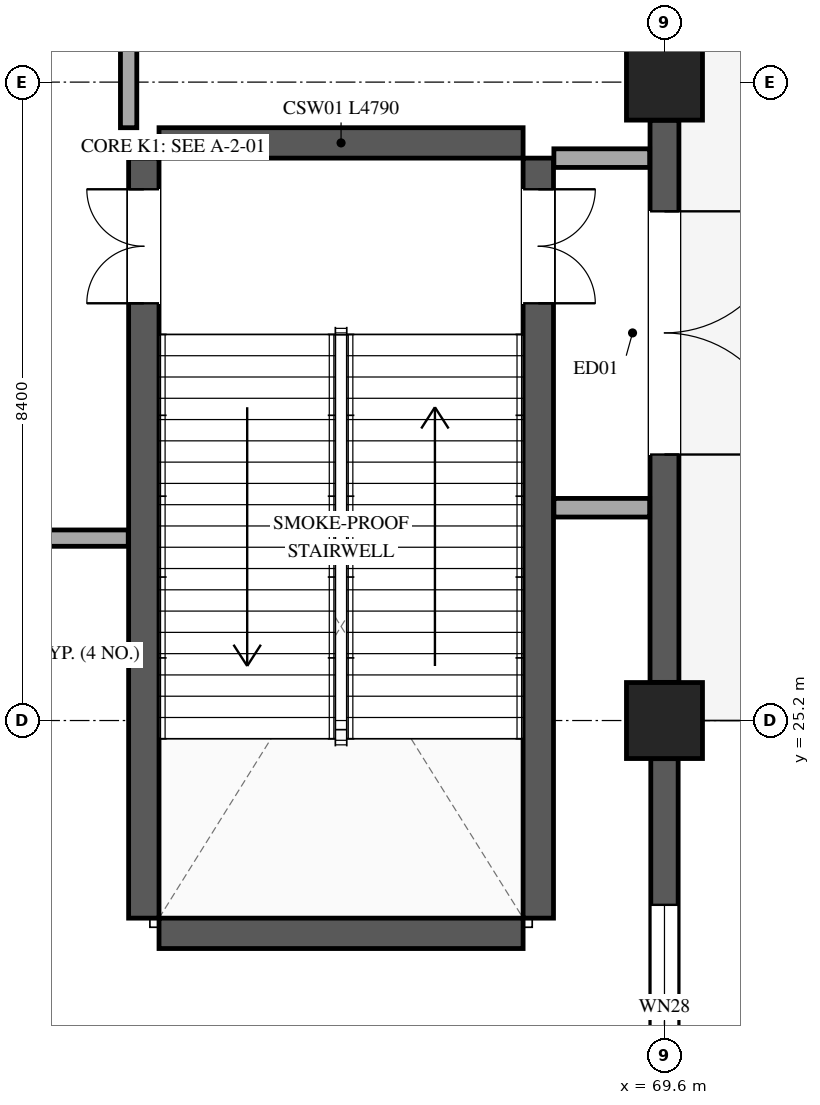
"""IFC4 building model, lengths in metres.
Left out: names, types, materials, properties, quantities, classifications, styles, units other than length and angle.
Written with IfcOpenShell. Run it as: python <this file> out.ifc"""

import sys

from ifc_helpers import new_model, si_unit, direction, frame, frame_2d, origin, origin_2d, place, context, subcontext, project, spatial, rectangle, extrude, element, fill, save


model = new_model("IFC4")
c1 = context("Model", 3, precision=1e-05, world=origin(), true_north=direction((0.0, 1.0)))
c2 = subcontext(c1, "Body", "Model", "MODEL_VIEW")
j1 = project(units=[si_unit("LENGTHUNIT", "METRE"), si_unit("PLANEANGLEUNIT", "RADIAN")], contexts=[c1])
p1 = place(None, origin())
s1 = spatial("IfcSite", under=j1, at=p1, CompositionType="ELEMENT")
p2 = place(p1, origin())
s2 = spatial("IfcBuilding", under=s1, at=p2, CompositionType="ELEMENT")
p3 = place(p2, origin())
s3 = spatial("IfcBuildingStorey", under=s2, at=p3, CompositionType="ELEMENT", Elevation=0.0)
for number, where, z_axis, x_axis in (
    (1, (69.6, 25.2, 0.0), (0.0, 0.0, 1.0), (1.0, 0.0, 0.0)),
    (2, (69.6, 33.6, 0.0), (0.0, 0.0, 1.0), (1.0, 0.0, 0.0)),
):
    element("IfcColumn", number, at=place(p3, frame(where, z_axis=z_axis, x_axis=x_axis)), inside=s3, PredefinedType="COLUMN", context=c2, shape_type="SweptSolid", body=[
        extrude(rectangle(XDim=1.0, YDim=1.0, at=origin_2d()), origin(), (0.0, 0.0, 1.0), 6.0),
    ])
p4 = place(p3, frame((69.6, 33.098, 0.0), z_axis=(0.0, 0.0, 1.0), x_axis=(0.0, -1.0, 0.0)))
e3 = element("IfcWall", 3, at=p4, inside=s3, PredefinedType="STANDARD", context=c2, shape_type="SweptSolid", body=[
    extrude(rectangle(XDim=7.396, YDim=0.38, at=frame_2d((3.698, 0.0))), origin(), (0.0, 0.0, 1.0), 5.66),
])
p5 = place(p4, frame((1.198, 0.0, 0.0)))
e4 = element("IfcOpeningElement", 4, at=p5, cuts=e3, PredefinedType="OPENING", context=c2, shape_type="SweptSolid", body=[
    extrude(rectangle(XDim=3.2, YDim=2.4, at=frame_2d((1.6, 1.2))), frame((0.0, 0.2, 0.0), z_axis=(0.0, -1.0, 0.0), x_axis=(1.0, 0.0, 0.0)), (0.0, 0.0, 1.0), 0.4),
])
p6 = place(p3, frame((69.6, 24.698, 0.0), z_axis=(0.0, 0.0, 1.0), x_axis=(0.0, -1.0, 0.0)))
e5 = element("IfcWall", 5, at=p6, inside=s3, PredefinedType="STANDARD", context=c2, shape_type="SweptSolid", body=[
    extrude(rectangle(XDim=7.446, YDim=0.36, at=frame_2d((3.723, 0.0))), origin(), (0.0, 0.0, 1.0), 5.66),
])
p7 = place(p6, frame((1.923, 0.0, 0.85)))
e6 = element("IfcOpeningElement", 6, at=p7, cuts=e5, PredefinedType="OPENING", context=c2, shape_type="SweptSolid", body=[
    extrude(rectangle(XDim=3.6, YDim=1.85, at=frame_2d((1.8, 0.925))), frame((0.0, 0.19, 0.0), z_axis=(0.0, -1.0, 0.0), x_axis=(1.0, 0.0, 0.0)), (0.0, 0.0, 1.0), 0.38),
])
p8 = place(p3, frame((62.75, 22.6, 0.0), z_axis=(0.0, 0.0, 1.0), x_axis=(0.0, 1.0, 0.0)))
e7 = element("IfcWall", 7, at=p8, inside=s3, PredefinedType="SHEAR", context=c2, shape_type="SweptSolid", body=[
    extrude(rectangle(XDim=10.0, YDim=0.4, at=frame_2d((5.0, 0.0))), origin(), (0.0, 0.0, 1.0), 6.0),
])
p9 = place(p8, frame((8.09, 0.0, 0.0)))
e8 = element("IfcOpeningElement", 8, at=p9, cuts=e7, PredefinedType="OPENING", context=c2, shape_type="SweptSolid", body=[
    extrude(rectangle(XDim=1.5, YDim=2.2, at=frame_2d((0.75, 1.1))), frame((0.0, 0.21, 0.0), z_axis=(0.0, -1.0, 0.0), x_axis=(1.0, 0.0, 0.0)), (0.0, 0.0, 1.0), 0.42),
])
p10 = place(p3, frame((67.94, 32.6, 0.0), z_axis=(0.0, 0.0, 1.0), x_axis=(0.0, -1.0, 0.0)))
e9 = element("IfcWall", 9, at=p10, inside=s3, PredefinedType="SHEAR", context=c2, shape_type="SweptSolid", body=[
    extrude(rectangle(XDim=10.0, YDim=0.4, at=frame_2d((5.0, 0.0))), origin(), (0.0, 0.0, 1.0), 6.0),
])
p11 = place(p10, frame((0.41, 0.0, 0.0)))
e10 = element("IfcOpeningElement", 10, at=p11, cuts=e9, PredefinedType="OPENING", context=c2, shape_type="SweptSolid", body=[
    extrude(rectangle(XDim=1.5, YDim=2.2, at=frame_2d((0.75, 1.1))), frame((0.0, 0.21, 0.0), z_axis=(0.0, -1.0, 0.0), x_axis=(1.0, 0.0, 0.0)), (0.0, 0.0, 1.0), 0.42),
])
for number, where, z_axis, x_axis in (
    (11, (67.74, 22.4, 0.0), (0.0, 0.0, 1.0), (-1.0, 0.0, 0.0)),
    (12, (62.95, 32.8, 0.0), (0.0, 0.0, 1.0), (1.0, 0.0, 0.0)),
):
    element("IfcWall", number, at=place(p3, frame(where, z_axis=z_axis, x_axis=x_axis)), inside=s3, PredefinedType="SHEAR", context=c2, shape_type="SweptSolid", body=[
        extrude(rectangle(XDim=4.79, YDim=0.4, at=frame_2d((2.395, 0.0))), origin(), (0.0, 0.0, 1.0), 6.0),
    ])
for number, where, z_axis, x_axis in (
    (13, (69.405, 28.0, 0.0), (0.0, 0.0, 1.0), (-1.0, 0.0, 0.0)),
    (14, (68.145, 32.6, 0.0), (0.0, 0.0, 1.0), (1.0, 0.0, 0.0)),
):
    element("IfcWall", number, at=place(p3, frame(where, z_axis=z_axis, x_axis=x_axis)), inside=s3, PredefinedType="STANDARD", context=c2, shape_type="SweptSolid", body=[
        extrude(rectangle(XDim=1.26, YDim=0.245, at=frame_2d((0.63, 0.0))), origin(), (0.0, 0.0, 1.0), 5.06),
    ])
p12 = place(p3, frame((62.545, 27.6, 0.0), z_axis=(0.0, 0.0, 1.0), x_axis=(-1.0, 0.0, 0.0)))
e15 = element("IfcWall", 15, at=p12, inside=s3, PredefinedType="PARTITIONING", context=c2, shape_type="SweptSolid", body=[
    extrude(rectangle(XDim=5.745, YDim=0.215, at=frame_2d((2.873, 0.0))), origin(), (0.0, 0.0, 1.0), 4.91),
])
p13 = place(p12, frame((2.198, 0.0, 0.0)))
e16 = element("IfcOpeningElement", 16, at=p13, cuts=e15, PredefinedType="OPENING", context=c2, shape_type="SweptSolid", body=[
    extrude(rectangle(XDim=1.35, YDim=2.2, at=frame_2d((0.675, 1.1))), frame((0.0, 0.118, 0.0), z_axis=(0.0, -1.0, 0.0), x_axis=(1.0, 0.0, 0.0)), (0.0, 0.0, 1.0), 0.235),
])
p14 = place(p3, frame((62.55, 35.0, 0.0), z_axis=(0.0, 0.0, 1.0), x_axis=(0.0, -1.0, 0.0)))
e17 = element("IfcWall", 17, at=p14, inside=s3, PredefinedType="PARTITIONING", context=c2, shape_type="SweptSolid", body=[
    extrude(rectangle(XDim=2.0, YDim=0.215, at=frame_2d((1.0, 0.0))), origin(), (0.0, 0.0, 1.0), 4.91),
])
p15 = place(p5, origin())
e18 = element("IfcDoor", 18, at=p15, inside=s3, OperationType="DOUBLE_DOOR_SINGLE_SWING", PredefinedType="USERDEFINED", context=c2, shape_type="SweptSolid", body=[
    extrude(rectangle(XDim=3.2, YDim=2.4, at=frame_2d((1.6, 1.2))), frame((0.0, 0.025, 0.0), z_axis=(0.0, -1.0, 0.0), x_axis=(1.0, 0.0, 0.0)), (0.0, 0.0, 1.0), 0.05),
])
fill(e4, e18)
p16 = place(p7, origin())
e19 = element("IfcWindow", 19, at=p16, inside=s3, PartitioningType="TRIPLE_PANEL_VERTICAL", PredefinedType="WINDOW", context=c2, shape_type="SweptSolid", body=[
    extrude(rectangle(XDim=3.6, YDim=1.85, at=frame_2d((1.8, 0.925))), frame((0.0, 0.03, 0.0), z_axis=(0.0, -1.0, 0.0), x_axis=(1.0, 0.0, 0.0)), (0.0, 0.0, 1.0), 0.06),
])
fill(e6, e19)
p17 = place(p9, origin())
e20 = element("IfcDoor", 20, at=p17, inside=s3, OperationType="DOUBLE_DOOR_SINGLE_SWING", PredefinedType="DOOR", context=c2, shape_type="SweptSolid", body=[
    extrude(rectangle(XDim=1.5, YDim=2.2, at=frame_2d((0.75, 1.1))), frame((0.0, 0.025, 0.0), z_axis=(0.0, -1.0, 0.0), x_axis=(1.0, 0.0, 0.0)), (0.0, 0.0, 1.0), 0.05),
])
fill(e8, e20)
p18 = place(p11, origin())
e21 = element("IfcDoor", 21, at=p18, inside=s3, OperationType="DOUBLE_DOOR_SINGLE_SWING", PredefinedType="DOOR", context=c2, shape_type="SweptSolid", body=[
    extrude(rectangle(XDim=1.5, YDim=2.2, at=frame_2d((0.75, 1.1))), frame((0.0, 0.025, 0.0), z_axis=(0.0, -1.0, 0.0), x_axis=(1.0, 0.0, 0.0)), (0.0, 0.0, 1.0), 0.05),
])
fill(e10, e21)
save(model, sys.argv[1])
